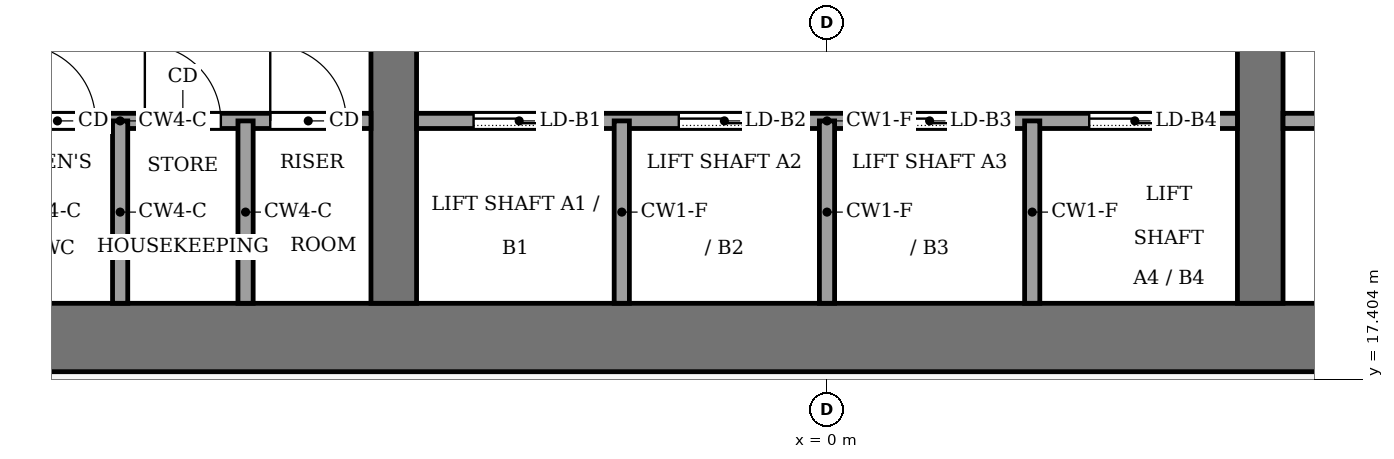
"""IFC4 building model, lengths in metres.
Left out: names, types, materials, properties, quantities, classifications, styles, units other than length and angle.
Written with IfcOpenShell. Run it as: python <this file> out.ifc"""

import sys

from ifc_helpers import new_model, si_unit, direction, frame, frame_2d, origin, place, context, subcontext, project, spatial, rectangle, extrude, element, fill, save


model = new_model("IFC4")
c1 = context("Model", 3, precision=1e-05, world=origin(), true_north=direction((0.0, 1.0)))
c2 = subcontext(c1, "Body", "Model", "MODEL_VIEW")
j1 = project(units=[si_unit("LENGTHUNIT", "METRE"), si_unit("PLANEANGLEUNIT", "RADIAN")], contexts=[c1])
p1 = place(None, origin())
s1 = spatial("IfcSite", under=j1, at=p1, CompositionType="ELEMENT")
p2 = place(p1, origin())
s2 = spatial("IfcBuilding", under=s1, at=p2, CompositionType="ELEMENT")
p3 = place(p2, frame((0.0, 0.0, 218.0)))
s3 = spatial("IfcBuildingStorey", under=s2, at=p3, CompositionType="ELEMENT", Elevation=218.0)
p4 = place(p3, frame((-13.5, 17.95, -0.13), z_axis=(0.0, 0.0, 1.0), x_axis=(1.0, 0.0, 0.0)))
e1 = element("IfcWall", 1, at=p4, inside=s3, PredefinedType="SHEAR", context=c2, shape_type="SweptSolid", body=[
    extrude(rectangle(XDim=27.0, YDim=0.9, at=frame_2d((13.5, 0.0))), origin(), (0.0, 0.0, 1.0), 4.0),
])
p5 = place(p3, frame((-5.7, 18.4, -0.13), z_axis=(0.0, 0.0, 1.0), x_axis=(0.0, 1.0, 0.0)))
e2 = element("IfcWall", 2, at=p5, inside=s3, PredefinedType="SHEAR", context=c2, shape_type="SweptSolid", body=[
    extrude(rectangle(XDim=19.2, YDim=0.6, at=frame_2d((9.6, 0.0))), origin(), (0.0, 0.0, 1.0), 4.0),
])
p6 = place(p5, frame((8.35, 0.0, 0.13)))
e3 = element("IfcOpeningElement", 3, at=p6, cuts=e2, PredefinedType="OPENING", context=c2, shape_type="SweptSolid", body=[
    extrude(rectangle(XDim=0.9, YDim=2.1, at=frame_2d((0.45, 1.05))), frame((0.0, 0.31, 0.0), z_axis=(0.0, -1.0, 0.0), x_axis=(1.0, 0.0, 0.0)), (0.0, 0.0, 1.0), 0.62),
])
p7 = place(p3, frame((5.7, 18.4, -0.13), z_axis=(0.0, 0.0, 1.0), x_axis=(0.0, 1.0, 0.0)))
e4 = element("IfcWall", 4, at=p7, inside=s3, PredefinedType="SHEAR", context=c2, shape_type="SweptSolid", body=[
    extrude(rectangle(XDim=19.2, YDim=0.6, at=frame_2d((9.6, 0.0))), origin(), (0.0, 0.0, 1.0), 4.0),
])
p8 = place(p7, frame((8.35, 0.0, 0.13)))
e5 = element("IfcOpeningElement", 5, at=p8, cuts=e4, PredefinedType="OPENING", context=c2, shape_type="SweptSolid", body=[
    extrude(rectangle(XDim=0.9, YDim=2.1, at=frame_2d((0.45, 1.05))), frame((0.0, 0.31, 0.0), z_axis=(0.0, -1.0, 0.0), x_axis=(1.0, 0.0, 0.0)), (0.0, 0.0, 1.0), 0.62),
])
p9 = place(p7, frame((13.3, 0.0, 0.13)))
e6 = element("IfcOpeningElement", 6, at=p9, cuts=e4, PredefinedType="OPENING", context=c2, shape_type="SweptSolid", body=[
    extrude(rectangle(XDim=2.4, YDim=2.4, at=frame_2d((1.2, 1.2))), frame((0.0, 0.31, 0.0), z_axis=(0.0, -1.0, 0.0), x_axis=(1.0, 0.0, 0.0)), (0.0, 0.0, 1.0), 0.62),
])
p10 = place(p3, frame((-12.6, 20.8, 0.0), z_axis=(0.0, 0.0, 1.0), x_axis=(1.0, 0.0, 0.0)))
e7 = element("IfcWall", 7, at=p10, inside=s3, PredefinedType="PARTITIONING", context=c2, shape_type="SweptSolid", body=[
    extrude(rectangle(XDim=6.6, YDim=0.2, at=frame_2d((3.3, 0.0))), origin(), (0.0, 0.0, 1.0), 3.87),
])
p11 = place(p10, frame((0.325, 0.0, 0.0)))
e8 = element("IfcOpeningElement", 8, at=p11, cuts=e7, PredefinedType="OPENING", context=c2, shape_type="SweptSolid", body=[
    extrude(rectangle(XDim=1.0, YDim=2.1, at=frame_2d((0.5, 1.05))), frame((0.0, 0.11, 0.0), z_axis=(0.0, -1.0, 0.0), x_axis=(1.0, 0.0, 0.0)), (0.0, 0.0, 1.0), 0.22),
])
p12 = place(p10, frame((1.975, 0.0, 0.0)))
e9 = element("IfcOpeningElement", 9, at=p12, cuts=e7, PredefinedType="OPENING", context=c2, shape_type="SweptSolid", body=[
    extrude(rectangle(XDim=1.0, YDim=2.1, at=frame_2d((0.5, 1.05))), frame((0.0, 0.11, 0.0), z_axis=(0.0, -1.0, 0.0), x_axis=(1.0, 0.0, 0.0)), (0.0, 0.0, 1.0), 0.22),
])
p13 = place(p10, frame((3.625, 0.0, 0.0)))
e10 = element("IfcOpeningElement", 10, at=p13, cuts=e7, PredefinedType="OPENING", context=c2, shape_type="SweptSolid", body=[
    extrude(rectangle(XDim=1.0, YDim=2.1, at=frame_2d((0.5, 1.05))), frame((0.0, 0.11, 0.0), z_axis=(0.0, -1.0, 0.0), x_axis=(1.0, 0.0, 0.0)), (0.0, 0.0, 1.0), 0.22),
])
p14 = place(p10, frame((5.275, 0.0, 0.0)))
e11 = element("IfcOpeningElement", 11, at=p14, cuts=e7, PredefinedType="OPENING", context=c2, shape_type="SweptSolid", body=[
    extrude(rectangle(XDim=1.0, YDim=2.1, at=frame_2d((0.5, 1.05))), frame((0.0, 0.11, 0.0), z_axis=(0.0, -1.0, 0.0), x_axis=(1.0, 0.0, 0.0)), (0.0, 0.0, 1.0), 0.22),
])
p15 = place(p3, frame((-5.4, 20.8, 0.0), z_axis=(0.0, 0.0, 1.0), x_axis=(1.0, 0.0, 0.0)))
e12 = element("IfcWall", 12, at=p15, inside=s3, PredefinedType="PARTITIONING", context=c2, shape_type="SweptSolid", body=[
    extrude(rectangle(XDim=10.8, YDim=0.2, at=frame_2d((5.4, 0.0))), origin(), (0.0, 0.0, 1.0), 3.87),
])
p16 = place(p15, frame((0.75, 0.0, 0.0)))
e13 = element("IfcOpeningElement", 13, at=p16, cuts=e12, PredefinedType="OPENING", context=c2, shape_type="SweptSolid", body=[
    extrude(rectangle(XDim=1.2, YDim=2.2, at=frame_2d((0.6, 1.1))), frame((0.0, 0.11, 0.0), z_axis=(0.0, -1.0, 0.0), x_axis=(1.0, 0.0, 0.0)), (0.0, 0.0, 1.0), 0.22),
])
p17 = place(p15, frame((3.45, 0.0, 0.0)))
e14 = element("IfcOpeningElement", 14, at=p17, cuts=e12, PredefinedType="OPENING", context=c2, shape_type="SweptSolid", body=[
    extrude(rectangle(XDim=1.2, YDim=2.2, at=frame_2d((0.6, 1.1))), frame((0.0, 0.11, 0.0), z_axis=(0.0, -1.0, 0.0), x_axis=(1.0, 0.0, 0.0)), (0.0, 0.0, 1.0), 0.22),
])
p18 = place(p15, frame((6.15, 0.0, 0.0)))
e15 = element("IfcOpeningElement", 15, at=p18, cuts=e12, PredefinedType="OPENING", context=c2, shape_type="SweptSolid", body=[
    extrude(rectangle(XDim=1.2, YDim=2.2, at=frame_2d((0.6, 1.1))), frame((0.0, 0.11, 0.0), z_axis=(0.0, -1.0, 0.0), x_axis=(1.0, 0.0, 0.0)), (0.0, 0.0, 1.0), 0.22),
])
p19 = place(p15, frame((8.85, 0.0, 0.0)))
e16 = element("IfcOpeningElement", 16, at=p19, cuts=e12, PredefinedType="OPENING", context=c2, shape_type="SweptSolid", body=[
    extrude(rectangle(XDim=1.2, YDim=2.2, at=frame_2d((0.6, 1.1))), frame((0.0, 0.11, 0.0), z_axis=(0.0, -1.0, 0.0), x_axis=(1.0, 0.0, 0.0)), (0.0, 0.0, 1.0), 0.22),
])
p20 = place(p3, frame((6.0, 20.8, 0.0), z_axis=(0.0, 0.0, 1.0), x_axis=(1.0, 0.0, 0.0)))
e17 = element("IfcWall", 17, at=p20, inside=s3, PredefinedType="PARTITIONING", context=c2, shape_type="SweptSolid", body=[
    extrude(rectangle(XDim=6.6, YDim=0.2, at=frame_2d((3.3, 0.0))), origin(), (0.0, 0.0, 1.0), 3.87),
])
p21 = place(p20, frame((2.8, 0.0, 0.0)))
e18 = element("IfcOpeningElement", 18, at=p21, cuts=e17, PredefinedType="OPENING", context=c2, shape_type="SweptSolid", body=[
    extrude(rectangle(XDim=1.0, YDim=2.1, at=frame_2d((0.5, 1.05))), frame((0.0, 0.11, 0.0), z_axis=(0.0, -1.0, 0.0), x_axis=(1.0, 0.0, 0.0)), (0.0, 0.0, 1.0), 0.22),
])
for number, where, z_axis, x_axis in (
    (19, (-9.3, 18.4, 0.0), (0.0, 0.0, 1.0), (0.0, 1.0, 0.0)),
    (20, (-7.65, 18.4, 0.0), (0.0, 0.0, 1.0), (0.0, 1.0, 0.0)),
    (21, (-2.7, 18.4, 0.0), (0.0, 0.0, 1.0), (0.0, 1.0, 0.0)),
    (22, (0.0, 18.4, 0.0), (0.0, 0.0, 1.0), (0.0, 1.0, 0.0)),
    (23, (2.7, 18.4, 0.0), (0.0, 0.0, 1.0), (0.0, 1.0, 0.0)),
):
    element("IfcWall", number, at=place(p3, frame(where, z_axis=z_axis, x_axis=x_axis)), inside=s3, PredefinedType="PARTITIONING", context=c2, shape_type="SweptSolid", body=[
        extrude(rectangle(XDim=2.4, YDim=0.2, at=frame_2d((1.2, 0.0))), origin(), (0.0, 0.0, 1.0), 3.87),
    ])
p22 = place(p16, origin())
e24 = element("IfcDoor", 24, at=p22, inside=s3, OperationType="SLIDING_TO_LEFT", PredefinedType="DOOR", context=c2, shape_type="SweptSolid", body=[
    extrude(rectangle(XDim=1.2, YDim=2.2, at=frame_2d((0.6, 1.1))), frame((0.0, 0.025, 0.0), z_axis=(0.0, -1.0, 0.0), x_axis=(1.0, 0.0, 0.0)), (0.0, 0.0, 1.0), 0.05),
])
fill(e13, e24)
p23 = place(p17, origin())
e25 = element("IfcDoor", 25, at=p23, inside=s3, OperationType="SLIDING_TO_LEFT", PredefinedType="DOOR", context=c2, shape_type="SweptSolid", body=[
    extrude(rectangle(XDim=1.2, YDim=2.2, at=frame_2d((0.6, 1.1))), frame((0.0, 0.025, 0.0), z_axis=(0.0, -1.0, 0.0), x_axis=(1.0, 0.0, 0.0)), (0.0, 0.0, 1.0), 0.05),
])
fill(e14, e25)
p24 = place(p18, origin())
e26 = element("IfcDoor", 26, at=p24, inside=s3, OperationType="SLIDING_TO_LEFT", PredefinedType="DOOR", context=c2, shape_type="SweptSolid", body=[
    extrude(rectangle(XDim=1.2, YDim=2.2, at=frame_2d((0.6, 1.1))), frame((0.0, 0.025, 0.0), z_axis=(0.0, -1.0, 0.0), x_axis=(1.0, 0.0, 0.0)), (0.0, 0.0, 1.0), 0.05),
])
fill(e15, e26)
p25 = place(p19, origin())
e27 = element("IfcDoor", 27, at=p25, inside=s3, OperationType="SLIDING_TO_LEFT", PredefinedType="DOOR", context=c2, shape_type="SweptSolid", body=[
    extrude(rectangle(XDim=1.2, YDim=2.2, at=frame_2d((0.6, 1.1))), frame((0.0, 0.025, 0.0), z_axis=(0.0, -1.0, 0.0), x_axis=(1.0, 0.0, 0.0)), (0.0, 0.0, 1.0), 0.05),
])
fill(e16, e27)
p26 = place(p12, origin())
e28 = element("IfcDoor", 28, at=p26, inside=s3, OperationType="SINGLE_SWING_RIGHT", PredefinedType="DOOR", context=c2, shape_type="SweptSolid", body=[
    extrude(rectangle(XDim=1.0, YDim=2.1, at=frame_2d((0.5, 1.05))), frame((0.0, 0.025, 0.0), z_axis=(0.0, -1.0, 0.0), x_axis=(1.0, 0.0, 0.0)), (0.0, 0.0, 1.0), 0.05),
])
fill(e9, e28)
p27 = place(p13, origin())
e29 = element("IfcDoor", 29, at=p27, inside=s3, OperationType="SINGLE_SWING_LEFT", PredefinedType="DOOR", context=c2, shape_type="SweptSolid", body=[
    extrude(rectangle(XDim=1.0, YDim=2.1, at=frame_2d((0.5, 1.05))), frame((0.0, 0.025, 0.0), z_axis=(0.0, -1.0, 0.0), x_axis=(1.0, 0.0, 0.0)), (0.0, 0.0, 1.0), 0.05),
])
fill(e10, e29)
p28 = place(p14, origin())
e30 = element("IfcDoor", 30, at=p28, inside=s3, OperationType="SINGLE_SWING_LEFT", PredefinedType="DOOR", context=c2, shape_type="SweptSolid", body=[
    extrude(rectangle(XDim=1.0, YDim=2.1, at=frame_2d((0.5, 1.05))), frame((0.0, 0.025, 0.0), z_axis=(0.0, -1.0, 0.0), x_axis=(1.0, 0.0, 0.0)), (0.0, 0.0, 1.0), 0.05),
])
fill(e11, e30)
save(model, sys.argv[1])
